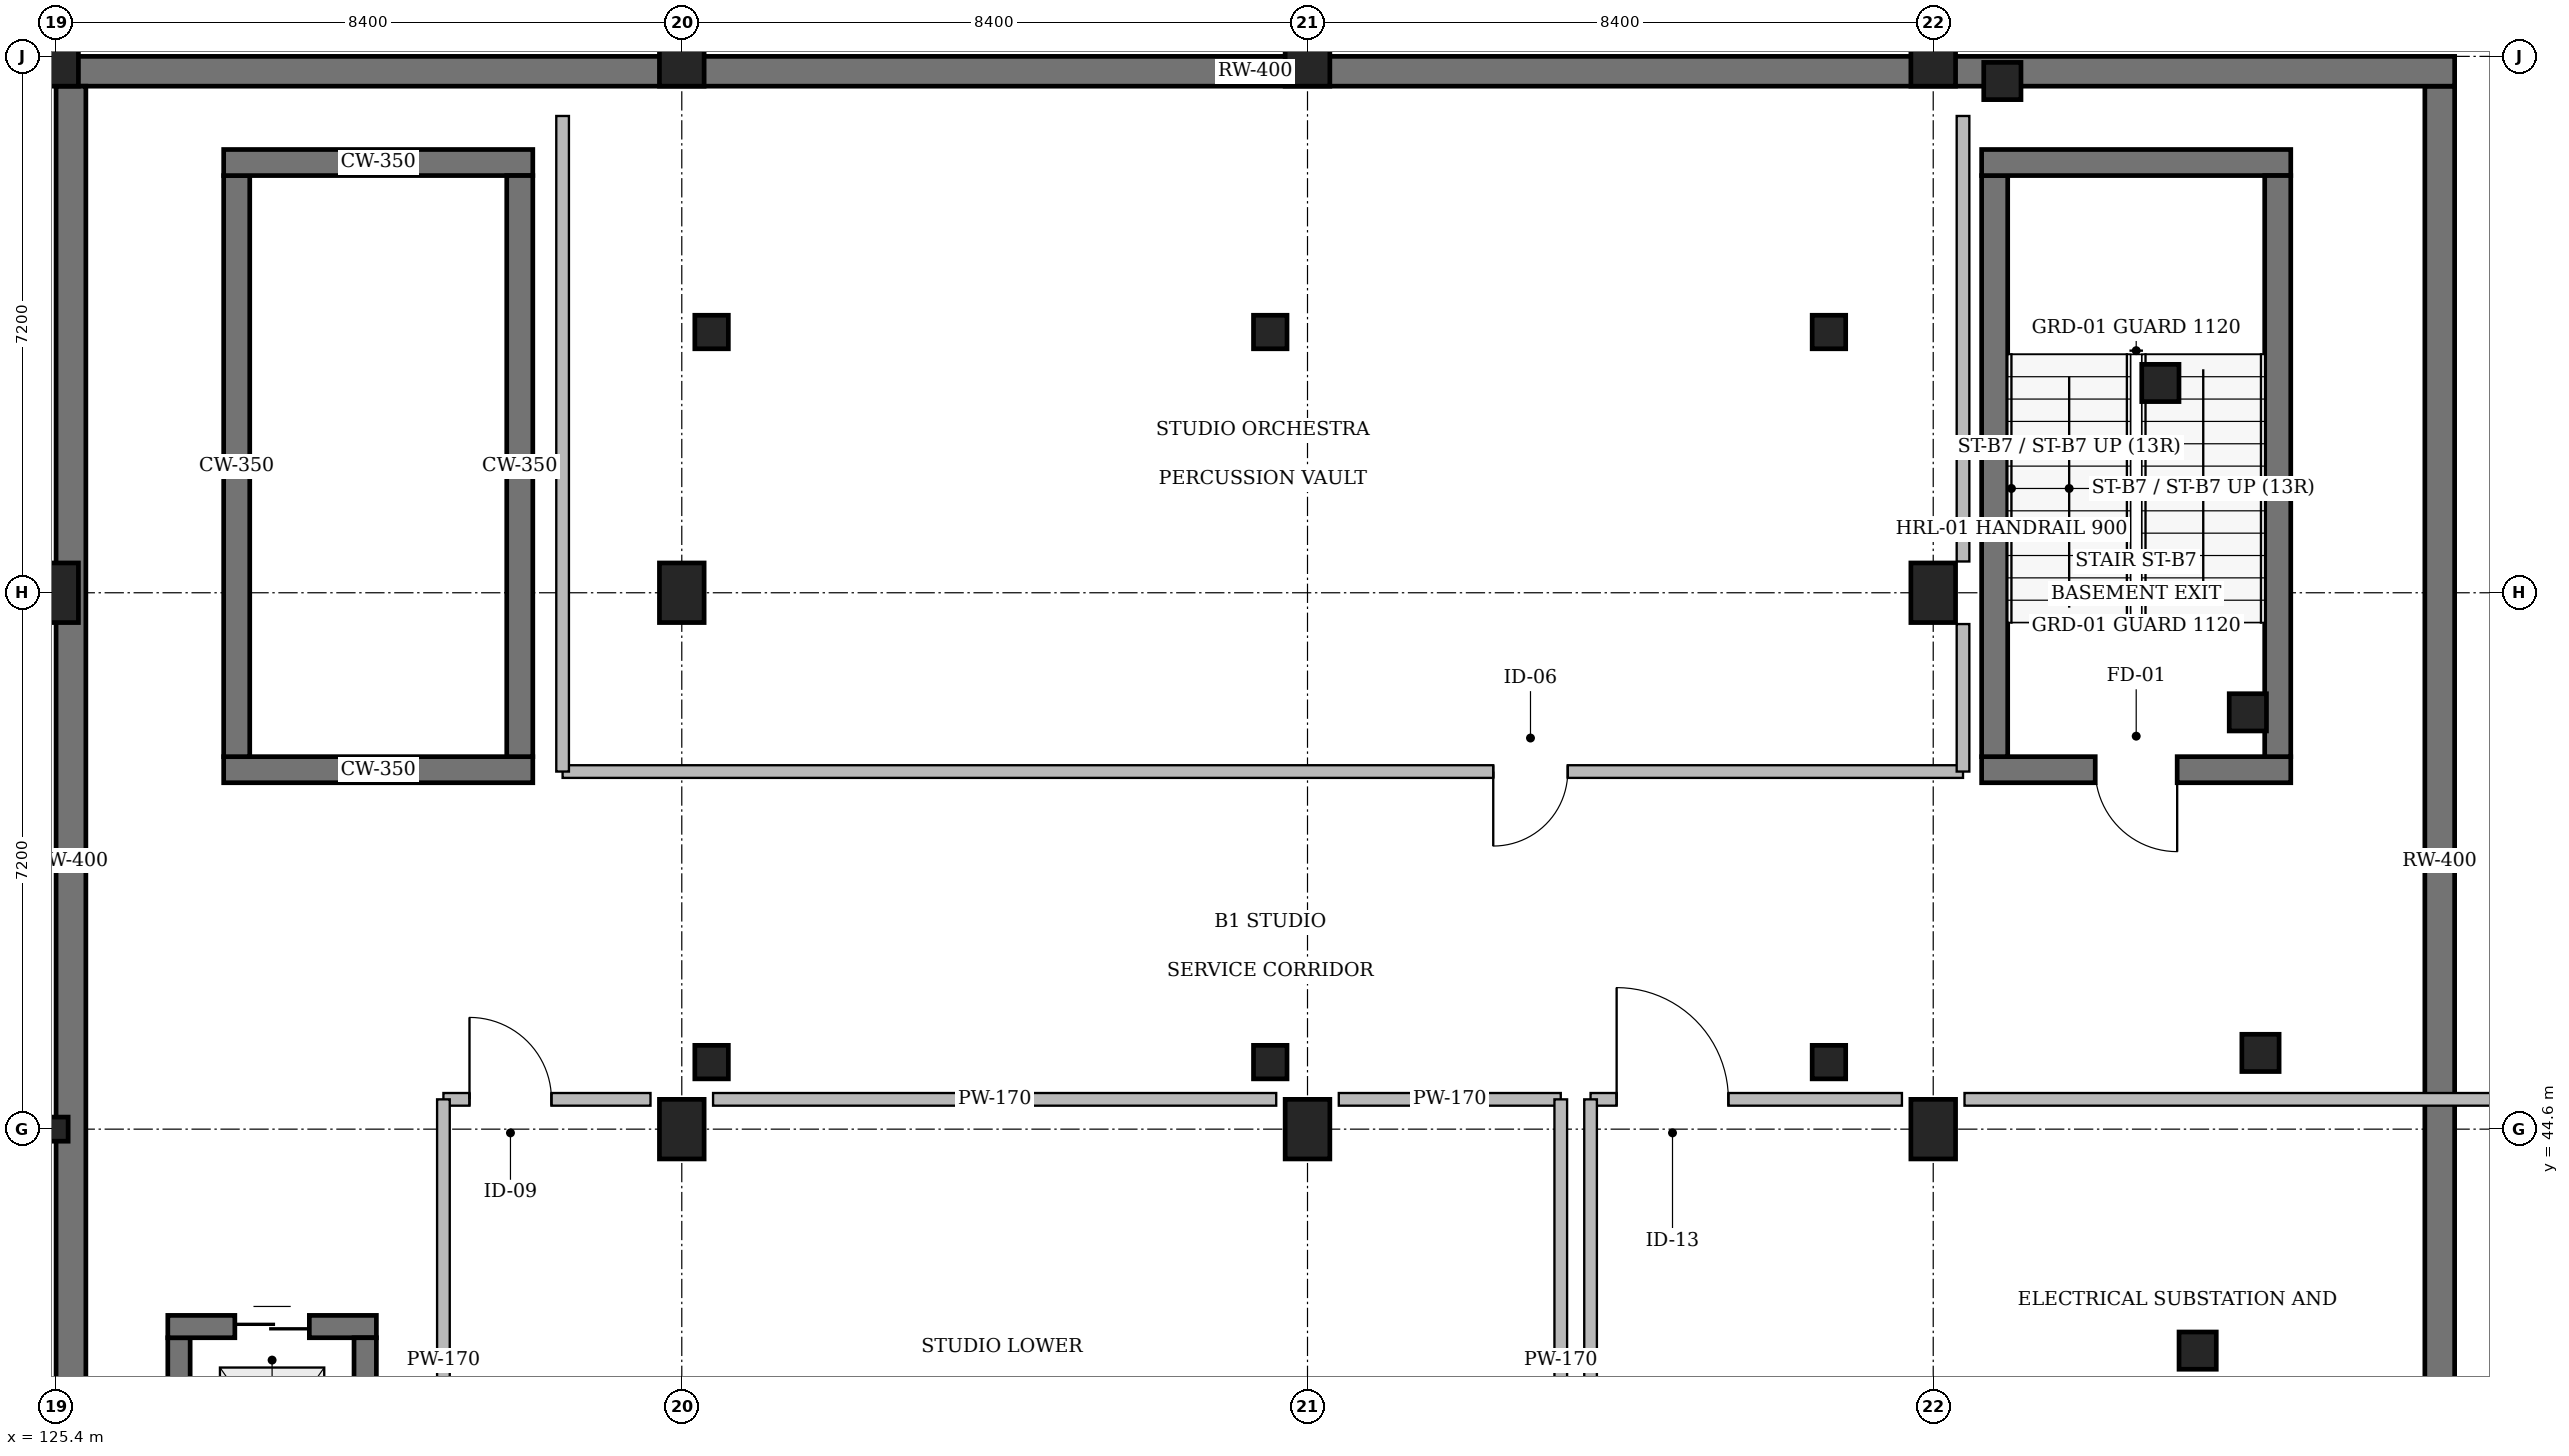
"""IFC4 building model, lengths in metres.
Left out: names, types, materials, properties, quantities, classifications, styles, units other than length and angle.
Written with IfcOpenShell. Run it as: python <this file> out.ifc"""

import sys

from ifc_helpers import new_model, si_unit, direction, frame, frame_2d, origin, origin_2d, place, context, subcontext, project, spatial, rectangle, hollow_circle, extrude, element, fill, save


model = new_model("IFC4")
c1 = context("Model", 3, precision=1e-05, world=origin(), true_north=direction((0.0, 1.0)))
c2 = subcontext(c1, "Body", "Model", "MODEL_VIEW")
j1 = project(units=[si_unit("LENGTHUNIT", "METRE"), si_unit("PLANEANGLEUNIT", "RADIAN")], contexts=[c1])
p1 = place(None, origin())
s1 = spatial("IfcSite", under=j1, at=p1, CompositionType="ELEMENT")
p2 = place(p1, origin())
s2 = spatial("IfcBuilding", under=s1, at=p2, CompositionType="ELEMENT")
p3 = place(p2, frame((0.0, 0.0, -4.8)))
s3 = spatial("IfcBuildingStorey", under=s2, at=p3, CompositionType="ELEMENT", Elevation=-4.8)
p4 = place(p3, frame((125.4, 44.6, 0.0), z_axis=(0.0, 0.0, 1.0), x_axis=(1.0, 0.0, 0.0)))
e1 = element("IfcColumn", 1, at=p4, inside=s3, PredefinedType="COLUMN", context=c2, shape_type="SweptSolid", body=[
    extrude(hollow_circle(Radius=0.162, WallThickness=0.012, at=origin_2d()), origin(), (0.0, 0.0, 1.0), 4.8),
])
for number, where, z_axis, x_axis in (
    (2, (125.4, 51.8, 0.0), (0.0, 0.0, 1.0), (1.0, 0.0, 0.0)),
    (3, (125.4, 59.0, 0.0), (0.0, 0.0, 1.0), (1.0, 0.0, 0.0)),
    (4, (133.8, 44.6, 0.0), (0.0, 0.0, 1.0), (1.0, 0.0, 0.0)),
    (5, (133.8, 51.8, 0.0), (0.0, 0.0, 1.0), (1.0, 0.0, 0.0)),
    (6, (133.8, 59.0, 0.0), (0.0, 0.0, 1.0), (1.0, 0.0, 0.0)),
    (7, (142.2, 44.6, 0.0), (0.0, 0.0, 1.0), (1.0, 0.0, 0.0)),
    (8, (142.2, 59.0, 0.0), (0.0, 0.0, 1.0), (1.0, 0.0, 0.0)),
    (9, (150.6, 44.6, 0.0), (0.0, 0.0, 1.0), (1.0, 0.0, 0.0)),
    (10, (150.6, 51.8, 0.0), (0.0, 0.0, 1.0), (1.0, 0.0, 0.0)),
    (11, (150.6, 59.0, 0.0), (0.0, 0.0, 1.0), (1.0, 0.0, 0.0)),
):
    element("IfcColumn", number, at=place(p3, frame(where, z_axis=z_axis, x_axis=x_axis)), inside=s3, PredefinedType="COLUMN", context=c2, shape_type="SweptSolid", body=[
        extrude(rectangle(XDim=0.6, YDim=0.8, at=origin_2d()), origin(), (0.0, 0.0, 1.0), 4.8),
    ])
for number, where, z_axis, x_axis in (
    (12, (134.2, 55.3, 0.0), (0.0, 0.0, 1.0), (1.0, 0.0, 0.0)),
    (13, (141.7, 55.3, 0.0), (0.0, 0.0, 1.0), (1.0, 0.0, 0.0)),
    (14, (149.2, 55.3, 0.0), (0.0, 0.0, 1.0), (1.0, 0.0, 0.0)),
    (15, (134.2, 45.5, 0.0), (0.0, 0.0, 1.0), (1.0, 0.0, 0.0)),
    (16, (141.7, 45.5, 0.0), (0.0, 0.0, 1.0), (1.0, 0.0, 0.0)),
    (17, (149.2, 45.5, 0.0), (0.0, 0.0, 1.0), (1.0, 0.0, 0.0)),
):
    element("IfcColumn", number, at=place(p3, frame(where, z_axis=z_axis, x_axis=x_axis)), inside=s3, PredefinedType="COLUMN", context=c2, shape_type="SweptSolid", body=[
        extrude(rectangle(XDim=0.45, YDim=0.45, at=origin_2d()), origin(), (0.0, 0.0, 1.0), 4.8),
    ])
for number, where, z_axis, x_axis in (
    (18, (151.528, 58.669, 0.0), (0.0, 0.0, 1.0), (1.0, 0.0, 0.0)),
    (19, (153.649, 54.616, 0.0), (0.0, 0.0, 1.0), (1.0, 0.0, 0.0)),
    (20, (154.824, 50.195, 0.0), (0.0, 0.0, 1.0), (1.0, 0.0, 0.0)),
    (21, (154.993, 45.623, 0.0), (0.0, 0.0, 1.0), (1.0, 0.0, 0.0)),
    (22, (154.15, 41.627, 0.0), (0.0, 0.0, 1.0), (1.0, 0.0, 0.0)),
):
    element("IfcColumn", number, at=place(p3, frame(where, z_axis=z_axis, x_axis=x_axis)), inside=s3, PredefinedType="COLUMN", context=c2, shape_type="SweptSolid", body=[
        extrude(rectangle(XDim=0.5, YDim=0.5, at=origin_2d()), origin(), (0.0, 0.0, 1.0), 4.8),
    ])
p5 = place(p3, frame((131.8, 49.425, 0.0), z_axis=(0.0, 0.0, 1.0), x_axis=(-1.0, 0.0, 0.0)))
e23 = element("IfcWall", 23, at=p5, inside=s3, PredefinedType="SOLIDWALL", context=c2, shape_type="SweptSolid", body=[
    extrude(rectangle(XDim=4.15, YDim=0.35, at=frame_2d((2.075, 0.0))), origin(), (0.0, 0.0, 1.0), 4.52),
])
p6 = place(p3, frame((127.825, 49.6, 0.0), z_axis=(0.0, 0.0, 1.0), x_axis=(0.0, 1.0, 0.0)))
e24 = element("IfcWall", 24, at=p6, inside=s3, PredefinedType="SOLIDWALL", context=c2, shape_type="SweptSolid", body=[
    extrude(rectangle(XDim=7.8, YDim=0.35, at=frame_2d((3.9, 0.0))), origin(), (0.0, 0.0, 1.0), 4.52),
])
p7 = place(p3, frame((127.65, 57.575, 0.0), z_axis=(0.0, 0.0, 1.0), x_axis=(1.0, 0.0, 0.0)))
e25 = element("IfcWall", 25, at=p7, inside=s3, PredefinedType="SOLIDWALL", context=c2, shape_type="SweptSolid", body=[
    extrude(rectangle(XDim=4.15, YDim=0.35, at=frame_2d((2.075, 0.0))), origin(), (0.0, 0.0, 1.0), 4.52),
])
p8 = place(p3, frame((131.625, 57.4, 0.0), z_axis=(0.0, 0.0, 1.0), x_axis=(0.0, -1.0, 0.0)))
e26 = element("IfcWall", 26, at=p8, inside=s3, PredefinedType="SOLIDWALL", context=c2, shape_type="SweptSolid", body=[
    extrude(rectangle(XDim=7.8, YDim=0.35, at=frame_2d((3.9, 0.0))), origin(), (0.0, 0.0, 1.0), 4.52),
])
p9 = place(p3, frame((155.4, 49.425, 0.0), z_axis=(0.0, 0.0, 1.0), x_axis=(-1.0, 0.0, 0.0)))
e27 = element("IfcWall", 27, at=p9, inside=s3, PredefinedType="SOLIDWALL", context=c2, shape_type="SweptSolid", body=[
    extrude(rectangle(XDim=4.15, YDim=0.35, at=frame_2d((2.075, 0.0))), origin(), (0.0, 0.0, 1.0), 4.56),
])
p10 = place(p9, frame((1.525, 0.0, 0.0)))
e28 = element("IfcOpeningElement", 28, at=p10, cuts=e27, PredefinedType="OPENING", context=c2, shape_type="SweptSolid", body=[
    extrude(rectangle(XDim=1.1, YDim=2.15, at=frame_2d((0.55, 1.075))), frame((0.0, 0.195, 0.0), z_axis=(0.0, -1.0, 0.0), x_axis=(1.0, 0.0, 0.0)), (0.0, 0.0, 1.0), 0.39),
])
p11 = place(p3, frame((151.425, 49.6, 0.0), z_axis=(0.0, 0.0, 1.0), x_axis=(0.0, 1.0, 0.0)))
e29 = element("IfcWall", 29, at=p11, inside=s3, PredefinedType="SOLIDWALL", context=c2, shape_type="SweptSolid", body=[
    extrude(rectangle(XDim=7.8, YDim=0.35, at=frame_2d((3.9, 0.0))), origin(), (0.0, 0.0, 1.0), 4.56),
])
p12 = place(p3, frame((151.25, 57.575, 0.0), z_axis=(0.0, 0.0, 1.0), x_axis=(1.0, 0.0, 0.0)))
e30 = element("IfcWall", 30, at=p12, inside=s3, PredefinedType="SOLIDWALL", context=c2, shape_type="SweptSolid", body=[
    extrude(rectangle(XDim=4.15, YDim=0.35, at=frame_2d((2.075, 0.0))), origin(), (0.0, 0.0, 1.0), 4.56),
])
p13 = place(p3, frame((155.225, 57.4, 0.0), z_axis=(0.0, 0.0, 1.0), x_axis=(0.0, -1.0, 0.0)))
e31 = element("IfcWall", 31, at=p13, inside=s3, PredefinedType="SOLIDWALL", context=c2, shape_type="SweptSolid", body=[
    extrude(rectangle(XDim=7.8, YDim=0.35, at=frame_2d((3.9, 0.0))), origin(), (0.0, 0.0, 1.0), 4.56),
])
p14 = place(p3, frame((127.05, 39.0, 0.0), z_axis=(0.0, 0.0, 1.0), x_axis=(0.0, 1.0, 0.0)))
e32 = element("IfcWall", 32, at=p14, inside=s3, PredefinedType="SOLIDWALL", context=c2, shape_type="SweptSolid", body=[
    extrude(rectangle(XDim=2.8, YDim=0.3, at=frame_2d((1.4, 0.0))), origin(), (0.0, 0.0, 1.0), 4.8),
])
p15 = place(p3, frame((126.9, 41.95, 0.0), z_axis=(0.0, 0.0, 1.0), x_axis=(1.0, 0.0, 0.0)))
e33 = element("IfcWall", 33, at=p15, inside=s3, PredefinedType="SOLIDWALL", context=c2, shape_type="SweptSolid", body=[
    extrude(rectangle(XDim=2.8, YDim=0.3, at=frame_2d((1.4, 0.0))), origin(), (0.0, 0.0, 1.0), 4.8),
])
p16 = place(p15, frame((0.9, 0.0, 0.0)))
e34 = element("IfcOpeningElement", 34, at=p16, cuts=e33, PredefinedType="OPENING", context=c2, shape_type="SweptSolid", body=[
    extrude(rectangle(XDim=1.0, YDim=2.15, at=frame_2d((0.5, 1.075))), frame((0.0, 0.17, 0.0), z_axis=(0.0, -1.0, 0.0), x_axis=(1.0, 0.0, 0.0)), (0.0, 0.0, 1.0), 0.34),
])
p17 = place(p3, frame((129.55, 41.8, 0.0), z_axis=(0.0, 0.0, 1.0), x_axis=(0.0, -1.0, 0.0)))
e35 = element("IfcWall", 35, at=p17, inside=s3, PredefinedType="SOLIDWALL", context=c2, shape_type="SweptSolid", body=[
    extrude(rectangle(XDim=2.8, YDim=0.3, at=frame_2d((1.4, 0.0))), origin(), (0.0, 0.0, 1.0), 4.8),
])
p18 = place(p3, frame((157.4, 37.8, 0.0), z_axis=(0.0, 0.0, 1.0), x_axis=(0.0, 1.0, 0.0)))
e36 = element("IfcWall", 36, at=p18, inside=s3, PredefinedType="SOLIDWALL", context=c2, shape_type="SweptSolid", body=[
    extrude(rectangle(XDim=20.8, YDim=0.4, at=frame_2d((10.4, 0.0))), origin(), (0.0, 0.0, 1.0), 4.48),
])
p19 = place(p3, frame((125.4, 58.8, 0.0), z_axis=(0.0, 0.0, 1.0), x_axis=(1.0, 0.0, 0.0)))
e37 = element("IfcWall", 37, at=p19, inside=s3, PredefinedType="SOLIDWALL", context=c2, shape_type="SweptSolid", body=[
    extrude(rectangle(XDim=32.2, YDim=0.4, at=frame_2d((16.1, 0.0))), origin(), (0.0, 0.0, 1.0), 4.48),
])
p20 = place(p3, frame((125.6, 37.8, 0.0), z_axis=(0.0, 0.0, 1.0), x_axis=(0.0, 1.0, 0.0)))
e38 = element("IfcWall", 38, at=p20, inside=s3, PredefinedType="SOLIDWALL", context=c2, shape_type="SweptSolid", body=[
    extrude(rectangle(XDim=20.8, YDim=0.4, at=frame_2d((10.4, 0.0))), origin(), (0.0, 0.0, 1.0), 4.48),
])
p21 = place(p3, frame((130.6, 45.0, 0.0), z_axis=(0.0, 0.0, 1.0), x_axis=(1.0, 0.0, 0.0)))
e39 = element("IfcWall", 39, at=p21, inside=s3, PredefinedType="PARTITIONING", context=c2, shape_type="SweptSolid", body=[
    extrude(rectangle(XDim=2.78, YDim=0.17, at=frame_2d((1.39, 0.0))), origin(), (0.0, 0.0, 1.0), 4.52),
])
p22 = place(p21, frame((0.35, 0.0, 0.0)))
e40 = element("IfcOpeningElement", 40, at=p22, cuts=e39, PredefinedType="OPENING", context=c2, shape_type="SweptSolid", body=[
    extrude(rectangle(XDim=1.1, YDim=2.1, at=frame_2d((0.55, 1.05))), frame((0.0, 0.105, 0.0), z_axis=(0.0, -1.0, 0.0), x_axis=(1.0, 0.0, 0.0)), (0.0, 0.0, 1.0), 0.21),
])
p23 = place(p3, frame((134.22, 45.0, 0.0), z_axis=(0.0, 0.0, 1.0), x_axis=(1.0, 0.0, 0.0)))
e41 = element("IfcWall", 41, at=p23, inside=s3, PredefinedType="PARTITIONING", context=c2, shape_type="SweptSolid", body=[
    extrude(rectangle(XDim=7.56, YDim=0.17, at=frame_2d((3.78, 0.0))), origin(), (0.0, 0.0, 1.0), 3.79),
])
p24 = place(p3, frame((142.62, 45.0, 0.0), z_axis=(0.0, 0.0, 1.0), x_axis=(1.0, 0.0, 0.0)))
e42 = element("IfcWall", 42, at=p24, inside=s3, PredefinedType="PARTITIONING", context=c2, shape_type="SweptSolid", body=[
    extrude(rectangle(XDim=2.98, YDim=0.17, at=frame_2d((1.49, 0.0))), origin(), (0.0, 0.0, 1.0), 3.79),
])
for number, where, z_axis, x_axis in (
    (43, (130.6, 38.0, 0.0), (0.0, 0.0, 1.0), (0.0, 1.0, 0.0)),
    (44, (145.6, 45.0, 0.0), (0.0, 0.0, 1.0), (0.0, -1.0, 0.0)),
):
    element("IfcWall", number, at=place(p3, frame(where, z_axis=z_axis, x_axis=x_axis)), inside=s3, PredefinedType="PARTITIONING", context=c2, shape_type="SweptSolid", body=[
        extrude(rectangle(XDim=7.0, YDim=0.17, at=frame_2d((3.5, 0.0))), origin(), (0.0, 0.0, 1.0), 4.52),
    ])
p25 = place(p3, frame((146.0, 45.0, 0.0), z_axis=(0.0, 0.0, 1.0), x_axis=(1.0, 0.0, 0.0)))
e45 = element("IfcWall", 45, at=p25, inside=s3, PredefinedType="PARTITIONING", context=c2, shape_type="SweptSolid", body=[
    extrude(rectangle(XDim=4.18, YDim=0.17, at=frame_2d((2.09, 0.0))), origin(), (0.0, 0.0, 1.0), 3.79),
])
p26 = place(p25, frame((0.35, 0.0, 0.0)))
e46 = element("IfcOpeningElement", 46, at=p26, cuts=e45, PredefinedType="OPENING", context=c2, shape_type="SweptSolid", body=[
    extrude(rectangle(XDim=1.5, YDim=2.2, at=frame_2d((0.75, 1.1))), frame((0.0, 0.105, 0.0), z_axis=(0.0, -1.0, 0.0), x_axis=(1.0, 0.0, 0.0)), (0.0, 0.0, 1.0), 0.21),
])
p27 = place(p3, frame((151.02, 45.0, 0.0), z_axis=(0.0, 0.0, 1.0), x_axis=(1.0, 0.0, 0.0)))
e47 = element("IfcWall", 47, at=p27, inside=s3, PredefinedType="PARTITIONING", context=c2, shape_type="SweptSolid", body=[
    extrude(rectangle(XDim=7.56, YDim=0.17, at=frame_2d((3.78, 0.0))), origin(), (0.0, 0.0, 1.0), 3.79),
])
p28 = place(p3, frame((146.0, 38.0, 0.0), z_axis=(0.0, 0.0, 1.0), x_axis=(0.0, 1.0, 0.0)))
e48 = element("IfcWall", 48, at=p28, inside=s3, PredefinedType="PARTITIONING", context=c2, shape_type="SweptSolid", body=[
    extrude(rectangle(XDim=7.0, YDim=0.17, at=frame_2d((3.5, 0.0))), origin(), (0.0, 0.0, 1.0), 4.52),
])
p29 = place(p3, frame((151.0, 49.4, 0.0), z_axis=(0.0, 0.0, 1.0), x_axis=(-1.0, 0.0, 0.0)))
e49 = element("IfcWall", 49, at=p29, inside=s3, PredefinedType="PARTITIONING", context=c2, shape_type="SweptSolid", body=[
    extrude(rectangle(XDim=18.8, YDim=0.17, at=frame_2d((9.4, 0.0))), origin(), (0.0, 0.0, 1.0), 4.52),
])
p30 = place(p29, frame((5.306, 0.0, 0.0)))
e50 = element("IfcOpeningElement", 50, at=p30, cuts=e49, PredefinedType="OPENING", context=c2, shape_type="SweptSolid", body=[
    extrude(rectangle(XDim=1.0, YDim=2.2, at=frame_2d((0.5, 1.1))), frame((0.0, 0.105, 0.0), z_axis=(0.0, -1.0, 0.0), x_axis=(1.0, 0.0, 0.0)), (0.0, 0.0, 1.0), 0.21),
])
p31 = place(p3, frame((132.2, 49.4, 0.0), z_axis=(0.0, 0.0, 1.0), x_axis=(0.0, 1.0, 0.0)))
e51 = element("IfcWall", 51, at=p31, inside=s3, PredefinedType="PARTITIONING", context=c2, shape_type="SweptSolid", body=[
    extrude(rectangle(XDim=8.8, YDim=0.17, at=frame_2d((4.4, 0.0))), origin(), (0.0, 0.0, 1.0), 4.52),
])
p32 = place(p3, frame((151.0, 58.2, 0.0), z_axis=(0.0, 0.0, 1.0), x_axis=(0.0, -1.0, 0.0)))
e52 = element("IfcWall", 52, at=p32, inside=s3, PredefinedType="PARTITIONING", context=c2, shape_type="SweptSolid", body=[
    extrude(rectangle(XDim=5.98, YDim=0.17, at=frame_2d((2.99, 0.0))), origin(), (0.0, 0.0, 1.0), 3.84),
])
p33 = place(p3, frame((151.0, 51.38, 0.0), z_axis=(0.0, 0.0, 1.0), x_axis=(0.0, -1.0, 0.0)))
e53 = element("IfcWall", 53, at=p33, inside=s3, PredefinedType="PARTITIONING", context=c2, shape_type="SweptSolid", body=[
    extrude(rectangle(XDim=1.98, YDim=0.17, at=frame_2d((0.99, 0.0))), origin(), (0.0, 0.0, 1.0), 3.84),
])
p34 = place(p10, origin())
e54 = element("IfcDoor", 54, at=p34, inside=s3, OperationType="SINGLE_SWING_LEFT", PredefinedType="DOOR", context=c2, shape_type="SweptSolid", body=[
    extrude(rectangle(XDim=1.1, YDim=2.15, at=frame_2d((0.55, 1.075))), frame((0.0, 0.025, 0.0), z_axis=(0.0, -1.0, 0.0), x_axis=(1.0, 0.0, 0.0)), (0.0, 0.0, 1.0), 0.05),
])
fill(e28, e54)
p35 = place(p16, origin())
e55 = element("IfcDoor", 55, at=p35, inside=s3, OperationType="DOUBLE_DOOR_SLIDING", PredefinedType="DOOR", context=c2, shape_type="SweptSolid", body=[
    extrude(rectangle(XDim=1.0, YDim=2.15, at=frame_2d((0.5, 1.075))), frame((0.0, 0.025, 0.0), z_axis=(0.0, -1.0, 0.0), x_axis=(1.0, 0.0, 0.0)), (0.0, 0.0, 1.0), 0.05),
])
fill(e34, e55)
p36 = place(p22, origin())
e56 = element("IfcDoor", 56, at=p36, inside=s3, OperationType="SINGLE_SWING_LEFT", PredefinedType="DOOR", context=c2, shape_type="SweptSolid", body=[
    extrude(rectangle(XDim=1.1, YDim=2.1, at=frame_2d((0.55, 1.05))), frame((0.0, 0.025, 0.0), z_axis=(0.0, -1.0, 0.0), x_axis=(1.0, 0.0, 0.0)), (0.0, 0.0, 1.0), 0.05),
])
fill(e40, e56)
p37 = place(p26, origin())
e57 = element("IfcDoor", 57, at=p37, inside=s3, OperationType="DOUBLE_DOOR_SINGLE_SWING", PredefinedType="DOOR", context=c2, shape_type="SweptSolid", body=[
    extrude(rectangle(XDim=1.5, YDim=2.2, at=frame_2d((0.75, 1.1))), frame((0.0, 0.025, 0.0), z_axis=(0.0, -1.0, 0.0), x_axis=(1.0, 0.0, 0.0)), (0.0, 0.0, 1.0), 0.05),
])
fill(e46, e57)
p38 = place(p30, origin())
e58 = element("IfcDoor", 58, at=p38, inside=s3, OperationType="SINGLE_SWING_RIGHT", PredefinedType="DOOR", context=c2, shape_type="SweptSolid", body=[
    extrude(rectangle(XDim=1.0, YDim=2.2, at=frame_2d((0.5, 1.1))), frame((0.0, 0.025, 0.0), z_axis=(0.0, -1.0, 0.0), x_axis=(1.0, 0.0, 0.0)), (0.0, 0.0, 1.0), 0.05),
])
fill(e50, e58)
save(model, sys.argv[1])
